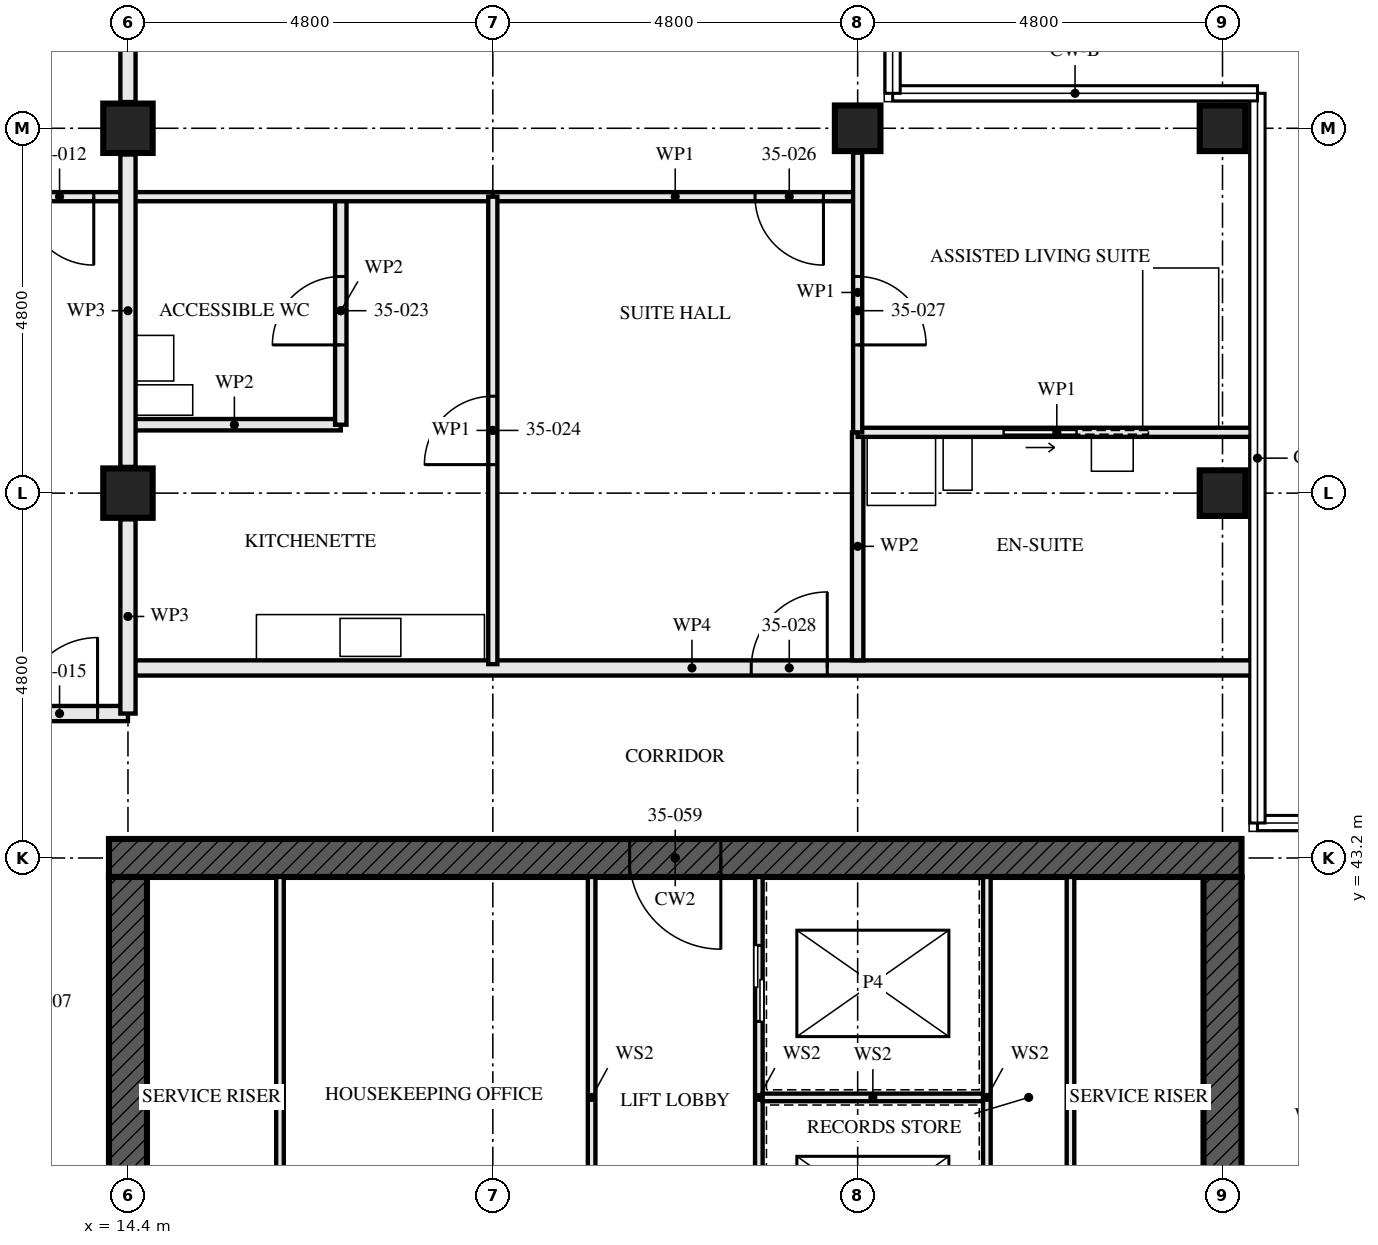
"""IFC4 building model, lengths in metres.
Left out: names, types, materials, properties, quantities, classifications, styles, units other than length and angle.
Written with IfcOpenShell. Run it as: python <this file> out.ifc"""

import sys

from ifc_helpers import new_model, si_unit, direction, frame, frame_2d, origin, origin_2d, place, context, subcontext, project, spatial, rectangle, hollow_rectangle, extrude, element, fill, save


model = new_model("IFC4")
c1 = context("Model", 3, precision=1e-05, world=origin(), true_north=direction((0.0, 1.0)))
c2 = subcontext(c1, "Body", "Model", "MODEL_VIEW")
j1 = project(units=[si_unit("LENGTHUNIT", "METRE"), si_unit("PLANEANGLEUNIT", "RADIAN")], contexts=[c1])
p1 = place(None, origin())
s1 = spatial("IfcSite", under=j1, at=p1, CompositionType="ELEMENT")
p2 = place(p1, origin())
s2 = spatial("IfcBuilding", under=s1, at=p2, CompositionType="ELEMENT")
p3 = place(p2, frame((0.0, 0.0, 129.5)))
s3 = spatial("IfcBuildingStorey", under=s2, at=p3, CompositionType="ELEMENT", Elevation=129.5)
for number, where, z_axis, x_axis in (
    (1, (14.4, 48.0, 0.0), (0.0, 0.0, 1.0), (1.0, 0.0, 0.0)),
    (2, (14.4, 52.8, 0.0), (0.0, 0.0, 1.0), (1.0, 0.0, 0.0)),
):
    element("IfcColumn", number, at=place(p3, frame(where, z_axis=z_axis, x_axis=x_axis)), inside=s3, PredefinedType="COLUMN", context=c2, shape_type="SweptSolid", body=[
        extrude(hollow_rectangle(XDim=0.65, YDim=0.65, WallThickness=0.05, at=origin_2d()), origin(), (0.0, 0.0, 1.0), 3.5),
    ])
for number, where, z_axis, x_axis in (
    (3, (24.0, 52.8, 0.0), (0.0, 0.0, 1.0), (0.0, 1.0, 0.0)),
    (4, (28.8, 48.0, 0.0), (0.0, 0.0, 1.0), (1.0, 0.0, 0.0)),
    (5, (28.8, 52.8, 0.0), (0.0, 0.0, 1.0), (0.0, 1.0, 0.0)),
):
    element("IfcColumn", number, at=place(p3, frame(where, z_axis=z_axis, x_axis=x_axis)), inside=s3, PredefinedType="COLUMN", context=c2, shape_type="SweptSolid", body=[
        extrude(hollow_rectangle(XDim=0.6, YDim=0.6, WallThickness=0.08, at=origin_2d()), origin(), (0.0, 0.0, 1.0), 3.5),
    ])
p4 = place(p3, frame((29.05, 43.2, -0.17), z_axis=(0.0, 0.0, 1.0), x_axis=(-1.0, 0.0, 0.0)))
e6 = element("IfcWall", 6, at=p4, inside=s3, PredefinedType="SHEAR", context=c2, shape_type="SweptSolid", body=[
    extrude(rectangle(XDim=14.9, YDim=0.5, at=frame_2d((7.45, 0.0))), origin(), (0.0, 0.0, 1.0), 3.5),
])
p5 = place(p4, frame((6.85, 0.0, 0.17)))
e7 = element("IfcOpeningElement", 7, at=p5, cuts=e6, PredefinedType="OPENING", context=c2, shape_type="SweptSolid", body=[
    extrude(rectangle(XDim=1.2, YDim=2.1, at=frame_2d((0.6, 1.05))), frame((0.0, 0.26, 0.0), z_axis=(0.0, -1.0, 0.0), x_axis=(1.0, 0.0, 0.0)), (0.0, 0.0, 1.0), 0.521),
])
p6 = place(p3, frame((14.4, 42.95, -0.17), z_axis=(0.0, 0.0, 1.0), x_axis=(0.0, -1.0, 0.0)))
e8 = element("IfcWall", 8, at=p6, inside=s3, PredefinedType="SHEAR", context=c2, shape_type="SweptSolid", body=[
    extrude(rectangle(XDim=13.9, YDim=0.5, at=frame_2d((6.95, 0.0))), origin(), (0.0, 0.0, 1.0), 3.5),
])
p7 = place(p6, frame((6.35, 0.0, 0.17)))
e9 = element("IfcOpeningElement", 9, at=p7, cuts=e8, PredefinedType="OPENING", context=c2, shape_type="SweptSolid", body=[
    extrude(rectangle(XDim=1.2, YDim=2.1, at=frame_2d((0.6, 1.05))), frame((0.0, 0.26, 0.0), z_axis=(0.0, -1.0, 0.0), x_axis=(1.0, 0.0, 0.0)), (0.0, 0.0, 1.0), 0.521),
])
p8 = place(p3, frame((28.8, 29.05, -0.17), z_axis=(0.0, 0.0, 1.0), x_axis=(0.0, 1.0, 0.0)))
e10 = element("IfcWall", 10, at=p8, inside=s3, PredefinedType="SHEAR", context=c2, shape_type="SweptSolid", body=[
    extrude(rectangle(XDim=13.9, YDim=0.5, at=frame_2d((6.95, 0.0))), origin(), (0.0, 0.0, 1.0), 3.5),
])
p9 = place(p8, frame((6.35, 0.0, 0.17)))
e11 = element("IfcOpeningElement", 11, at=p9, cuts=e10, PredefinedType="OPENING", context=c2, shape_type="SweptSolid", body=[
    extrude(rectangle(XDim=1.2, YDim=2.1, at=frame_2d((0.6, 1.05))), frame((0.0, 0.26, 0.0), z_axis=(0.0, -1.0, 0.0), x_axis=(1.0, 0.0, 0.0)), (0.0, 0.0, 1.0), 0.521),
])
p10 = place(p3, frame((14.4, 51.9, 0.0), z_axis=(0.0, 0.0, 1.0), x_axis=(-1.0, 0.0, 0.0)))
e12 = element("IfcWall", 12, at=p10, inside=s3, PredefinedType="PARTITIONING", context=c2, shape_type="SweptSolid", body=[
    extrude(rectangle(XDim=4.8, YDim=0.12, at=frame_2d((2.4, 0.0))), origin(), (0.0, 0.0, 1.0), 3.33),
])
p11 = place(p10, frame((0.45, 0.0, 0.0)))
e13 = element("IfcOpeningElement", 13, at=p11, cuts=e12, PredefinedType="OPENING", context=c2, shape_type="SweptSolid", body=[
    extrude(rectangle(XDim=0.9, YDim=2.1, at=frame_2d((0.45, 1.05))), frame((0.0, 0.071, 0.0), z_axis=(0.0, -1.0, 0.0), x_axis=(1.0, 0.0, 0.0)), (0.0, 0.0, 1.0), 0.141),
])
p12 = place(p10, frame((2.925, 0.0, 0.0)))
e14 = element("IfcOpeningElement", 14, at=p12, cuts=e12, PredefinedType="OPENING", context=c2, shape_type="SweptSolid", body=[
    extrude(rectangle(XDim=0.95, YDim=2.1, at=frame_2d((0.475, 1.05))), frame((0.0, 0.071, 0.0), z_axis=(0.0, -1.0, 0.0), x_axis=(1.0, 0.0, 0.0)), (0.0, 0.0, 1.0), 0.141),
])
p13 = place(p3, frame((14.4, 45.1, 0.0), z_axis=(0.0, 0.0, 1.0), x_axis=(-1.0, 0.0, 0.0)))
e15 = element("IfcWall", 15, at=p13, inside=s3, PredefinedType="PARTITIONING", context=c2, shape_type="SweptSolid", body=[
    extrude(rectangle(XDim=9.6, YDim=0.2, at=frame_2d((4.8, 0.0))), origin(), (0.0, 0.0, 1.0), 3.33),
])
p14 = place(p13, frame((0.4, 0.0, 0.0)))
e16 = element("IfcOpeningElement", 16, at=p14, cuts=e15, PredefinedType="OPENING", context=c2, shape_type="SweptSolid", body=[
    extrude(rectangle(XDim=1.0, YDim=2.1, at=frame_2d((0.5, 1.05))), frame((0.0, 0.111, 0.0), z_axis=(0.0, -1.0, 0.0), x_axis=(1.0, 0.0, 0.0)), (0.0, 0.0, 1.0), 0.221),
])
p15 = place(p3, frame((24.0, 48.8, 0.0), z_axis=(0.0, 0.0, 1.0), x_axis=(0.0, -1.0, 0.0)))
e17 = element("IfcWall", 17, at=p15, inside=s3, PredefinedType="PARTITIONING", context=c2, shape_type="SweptSolid", body=[
    extrude(rectangle(XDim=3.0, YDim=0.15, at=frame_2d((1.5, 0.0))), origin(), (0.0, 0.0, 1.0), 2.55),
])
p16 = place(p3, frame((17.2, 51.9, 0.0), z_axis=(0.0, 0.0, 1.0), x_axis=(0.0, -1.0, 0.0)))
e18 = element("IfcWall", 18, at=p16, inside=s3, PredefinedType="PARTITIONING", context=c2, shape_type="SweptSolid", body=[
    extrude(rectangle(XDim=3.0, YDim=0.15, at=frame_2d((1.5, 0.0))), origin(), (0.0, 0.0, 1.0), 3.33),
])
p17 = place(p16, frame((1.05, 0.0, 0.0)))
e19 = element("IfcOpeningElement", 19, at=p17, cuts=e18, PredefinedType="OPENING", context=c2, shape_type="SweptSolid", body=[
    extrude(rectangle(XDim=0.9, YDim=2.1, at=frame_2d((0.45, 1.05))), frame((0.0, 0.085, 0.0), z_axis=(0.0, -1.0, 0.0), x_axis=(1.0, 0.0, 0.0)), (0.0, 0.0, 1.0), 0.171),
])
p18 = place(p3, frame((17.2, 48.9, 0.0), z_axis=(0.0, 0.0, 1.0), x_axis=(-1.0, 0.0, 0.0)))
e20 = element("IfcWall", 20, at=p18, inside=s3, PredefinedType="PARTITIONING", context=c2, shape_type="SweptSolid", body=[
    extrude(rectangle(XDim=2.8, YDim=0.15, at=frame_2d((1.4, 0.0))), origin(), (0.0, 0.0, 1.0), 3.33),
])
p19 = place(p3, frame((19.2, 51.9, 0.0), z_axis=(0.0, 0.0, 1.0), x_axis=(0.0, -1.0, 0.0)))
e21 = element("IfcWall", 21, at=p19, inside=s3, PredefinedType="PARTITIONING", context=c2, shape_type="SweptSolid", body=[
    extrude(rectangle(XDim=6.15, YDim=0.12, at=frame_2d((3.075, 0.0))), origin(), (0.0, 0.0, 1.0), 2.55),
])
p20 = place(p19, frame((2.625, 0.0, 0.0)))
e22 = element("IfcOpeningElement", 22, at=p20, cuts=e21, PredefinedType="OPENING", context=c2, shape_type="SweptSolid", body=[
    extrude(rectangle(XDim=0.9, YDim=2.1, at=frame_2d((0.45, 1.05))), frame((0.0, 0.071, 0.0), z_axis=(0.0, -1.0, 0.0), x_axis=(1.0, 0.0, 0.0)), (0.0, 0.0, 1.0), 0.141),
])
p21 = place(p3, frame((29.24, 48.8, 0.0), z_axis=(0.0, 0.0, 1.0), x_axis=(-1.0, 0.0, 0.0)))
e23 = element("IfcWall", 23, at=p21, inside=s3, PredefinedType="PARTITIONING", context=c2, shape_type="SweptSolid", body=[
    extrude(rectangle(XDim=5.24, YDim=0.12, at=frame_2d((2.62, 0.0))), origin(), (0.0, 0.0, 1.0), 2.32),
])
p22 = place(p21, frame((2.365, 0.0, 0.0)))
e24 = element("IfcOpeningElement", 24, at=p22, cuts=e23, PredefinedType="OPENING", context=c2, shape_type="SweptSolid", body=[
    extrude(rectangle(XDim=0.95, YDim=2.1, at=frame_2d((0.475, 1.05))), frame((0.0, 0.071, 0.0), z_axis=(0.0, -1.0, 0.0), x_axis=(1.0, 0.0, 0.0)), (0.0, 0.0, 1.0), 0.141),
])
p23 = place(p3, frame((24.0, 51.9, 0.0), z_axis=(0.0, 0.0, 1.0), x_axis=(-1.0, 0.0, 0.0)))
e25 = element("IfcWall", 25, at=p23, inside=s3, PredefinedType="PARTITIONING", context=c2, shape_type="SweptSolid", body=[
    extrude(rectangle(XDim=4.8, YDim=0.12, at=frame_2d((2.4, 0.0))), origin(), (0.0, 0.0, 1.0), 3.33),
])
p24 = place(p23, frame((0.45, 0.0, 0.0)))
e26 = element("IfcOpeningElement", 26, at=p24, cuts=e25, PredefinedType="OPENING", context=c2, shape_type="SweptSolid", body=[
    extrude(rectangle(XDim=0.9, YDim=2.1, at=frame_2d((0.45, 1.05))), frame((0.0, 0.071, 0.0), z_axis=(0.0, -1.0, 0.0), x_axis=(1.0, 0.0, 0.0)), (0.0, 0.0, 1.0), 0.141),
])
p25 = place(p3, frame((19.2, 51.9, 0.0), z_axis=(0.0, 0.0, 1.0), x_axis=(-1.0, 0.0, 0.0)))
e27 = element("IfcWall", 27, at=p25, inside=s3, PredefinedType="PARTITIONING", context=c2, shape_type="SweptSolid", body=[
    extrude(rectangle(XDim=4.8, YDim=0.12, at=frame_2d((2.4, 0.0))), origin(), (0.0, 0.0, 1.0), 3.33),
])
p26 = place(p3, frame((24.0, 52.48, 0.0), z_axis=(0.0, 0.0, 1.0), x_axis=(0.0, -1.0, 0.0)))
e28 = element("IfcWall", 28, at=p26, inside=s3, PredefinedType="PARTITIONING", context=c2, shape_type="SweptSolid", body=[
    extrude(rectangle(XDim=3.68, YDim=0.12, at=frame_2d((1.84, 0.0))), origin(), (0.0, 0.0, 1.0), 3.33),
])
p27 = place(p26, frame((1.63, 0.0, 0.0)))
e29 = element("IfcOpeningElement", 29, at=p27, cuts=e28, PredefinedType="OPENING", context=c2, shape_type="SweptSolid", body=[
    extrude(rectangle(XDim=0.9, YDim=2.1, at=frame_2d((0.45, 1.05))), frame((0.0, 0.071, 0.0), z_axis=(0.0, -1.0, 0.0), x_axis=(1.0, 0.0, 0.0)), (0.0, 0.0, 1.0), 0.141),
])
p28 = place(p3, frame((29.24, 45.7, 0.0), z_axis=(0.0, 0.0, 1.0), x_axis=(-1.0, 0.0, 0.0)))
e30 = element("IfcWall", 30, at=p28, inside=s3, PredefinedType="PARTITIONING", context=c2, shape_type="SweptSolid", body=[
    extrude(rectangle(XDim=14.84, YDim=0.2, at=frame_2d((7.42, 0.0))), origin(), (0.0, 0.0, 1.0), 2.32),
])
p29 = place(p28, frame((5.64, 0.0, 0.0)))
e31 = element("IfcOpeningElement", 31, at=p29, cuts=e30, PredefinedType="OPENING", context=c2, shape_type="SweptSolid", body=[
    extrude(rectangle(XDim=1.0, YDim=2.1, at=frame_2d((0.5, 1.05))), frame((0.0, 0.111, 0.0), z_axis=(0.0, -1.0, 0.0), x_axis=(1.0, 0.0, 0.0)), (0.0, 0.0, 1.0), 0.221),
])
for number, where, z_axis, x_axis in (
    (32, (16.4, 37.15, 0.0), (0.0, 0.0, 1.0), (0.0, 1.0, 0.0)),
    (33, (26.8, 37.15, 0.0), (0.0, 0.0, 1.0), (0.0, 1.0, 0.0)),
):
    element("IfcWall", number, at=place(p3, frame(where, z_axis=z_axis, x_axis=x_axis)), inside=s3, PredefinedType="SOLIDWALL", context=c2, shape_type="SweptSolid", body=[
        extrude(rectangle(XDim=5.8, YDim=0.1, at=frame_2d((2.9, 0.0))), origin(), (0.0, 0.0, 1.0), 3.33),
    ])
p30 = place(p3, frame((20.5, 37.15, 0.0), z_axis=(0.0, 0.0, 1.0), x_axis=(0.0, 1.0, 0.0)))
e34 = element("IfcWall", 34, at=p30, inside=s3, PredefinedType="SOLIDWALL", context=c2, shape_type="SweptSolid", body=[
    extrude(rectangle(XDim=5.8, YDim=0.1, at=frame_2d((2.9, 0.0))), origin(), (0.0, 0.0, 1.0), 3.33),
])
p31 = place(p30, frame((0.975, 0.0, 0.0)))
e35 = element("IfcOpeningElement", 35, at=p31, cuts=e34, PredefinedType="OPENING", context=c2, shape_type="SweptSolid", body=[
    extrude(rectangle(XDim=0.9, YDim=2.1, at=frame_2d((0.45, 1.05))), frame((0.0, 0.061, 0.0), z_axis=(0.0, -1.0, 0.0), x_axis=(1.0, 0.0, 0.0)), (0.0, 0.0, 1.0), 0.121),
])
p32 = place(p3, frame((22.7, 37.15, 0.0), z_axis=(0.0, 0.0, 1.0), x_axis=(0.0, 1.0, 0.0)))
e36 = element("IfcWall", 36, at=p32, inside=s3, PredefinedType="SOLIDWALL", context=c2, shape_type="SweptSolid", body=[
    extrude(rectangle(XDim=5.8, YDim=0.1, at=frame_2d((2.9, 0.0))), origin(), (0.0, 0.0, 1.0), 3.33),
])
p33 = place(p32, frame((0.925, 0.0, 0.0)))
e37 = element("IfcOpeningElement", 37, at=p33, cuts=e36, PredefinedType="OPENING", context=c2, shape_type="SweptSolid", body=[
    extrude(rectangle(XDim=1.0, YDim=2.1, at=frame_2d((0.5, 1.05))), frame((0.0, 0.061, 0.0), z_axis=(0.0, -1.0, 0.0), x_axis=(1.0, 0.0, 0.0)), (0.0, 0.0, 1.0), 0.121),
])
p34 = place(p32, frame((3.9, 0.0, 0.0)))
e38 = element("IfcOpeningElement", 38, at=p34, cuts=e36, PredefinedType="OPENING", context=c2, shape_type="SweptSolid", body=[
    extrude(rectangle(XDim=1.0, YDim=2.1, at=frame_2d((0.5, 1.05))), frame((0.0, 0.061, 0.0), z_axis=(0.0, -1.0, 0.0), x_axis=(1.0, 0.0, 0.0)), (0.0, 0.0, 1.0), 0.121),
])
p35 = place(p3, frame((22.75, 40.05, 0.0), z_axis=(0.0, 0.0, 1.0), x_axis=(1.0, 0.0, 0.0)))
e39 = element("IfcWall", 39, at=p35, inside=s3, PredefinedType="SOLIDWALL", context=c2, shape_type="SweptSolid", body=[
    extrude(rectangle(XDim=2.9, YDim=0.1, at=frame_2d((1.45, 0.0))), origin(), (0.0, 0.0, 1.0), 3.33),
])
p36 = place(p3, frame((25.7, 37.15, 0.0), z_axis=(0.0, 0.0, 1.0), x_axis=(0.0, 1.0, 0.0)))
e40 = element("IfcWall", 40, at=p36, inside=s3, PredefinedType="SOLIDWALL", context=c2, shape_type="SweptSolid", body=[
    extrude(rectangle(XDim=5.8, YDim=0.1, at=frame_2d((2.9, 0.0))), origin(), (0.0, 0.0, 1.0), 3.33),
])
p37 = place(p3, frame((14.4, 45.1, 0.0), z_axis=(0.0, 0.0, 1.0), x_axis=(0.0, 1.0, 0.0)))
e41 = element("IfcWall", 41, at=p37, inside=s3, PredefinedType="PARTITIONING", context=c2, shape_type="SweptSolid", body=[
    extrude(rectangle(XDim=2.555, YDim=0.2, at=frame_2d((1.277, 0.0))), origin(), (0.0, 0.0, 1.0), 2.32),
])
p38 = place(p3, frame((14.4, 48.345, 0.0), z_axis=(0.0, 0.0, 1.0), x_axis=(0.0, 1.0, 0.0)))
e42 = element("IfcWall", 42, at=p38, inside=s3, PredefinedType="PARTITIONING", context=c2, shape_type="SweptSolid", body=[
    extrude(rectangle(XDim=4.11, YDim=0.2, at=frame_2d((2.055, 0.0))), origin(), (0.0, 0.0, 1.0), 2.32),
])
p39 = place(p3, frame((14.4, 53.145, 0.0), z_axis=(0.0, 0.0, 1.0), x_axis=(0.0, 1.0, 0.0)))
e43 = element("IfcWall", 43, at=p39, inside=s3, PredefinedType="PARTITIONING", context=c2, shape_type="SweptSolid", body=[
    extrude(rectangle(XDim=4.135, YDim=0.2, at=frame_2d((2.067, 0.0))), origin(), (0.0, 0.0, 1.0), 2.32),
])
p40 = place(p11, origin())
e44 = element("IfcDoor", 44, at=p40, inside=s3, OperationType="SINGLE_SWING_RIGHT", PredefinedType="DOOR", context=c2, shape_type="SweptSolid", body=[
    extrude(rectangle(XDim=0.9, YDim=2.1, at=frame_2d((0.45, 1.05))), frame((0.0, 0.022, 0.0), z_axis=(0.0, -1.0, 0.0), x_axis=(1.0, 0.0, 0.0)), (0.0, 0.0, 1.0), 0.044),
])
fill(e13, e44)
p41 = place(p14, frame((1.0, 0.0, 0.0), z_axis=(0.0, 0.0, 1.0), x_axis=(-1.0, 0.0, 0.0)))
e45 = element("IfcDoor", 45, at=p41, inside=s3, OperationType="SINGLE_SWING_LEFT", PredefinedType="DOOR", context=c2, shape_type="SweptSolid", body=[
    extrude(rectangle(XDim=1.0, YDim=2.1, at=frame_2d((0.5, 1.05))), frame((0.0, 0.027, 0.0), z_axis=(0.0, -1.0, 0.0), x_axis=(1.0, 0.0, 0.0)), (0.0, 0.0, 1.0), 0.054),
])
fill(e16, e45)
p42 = place(p17, frame((0.9, 0.0, 0.0), z_axis=(0.0, 0.0, 1.0), x_axis=(-1.0, 0.0, 0.0)))
e46 = element("IfcDoor", 46, at=p42, inside=s3, OperationType="SINGLE_SWING_RIGHT", PredefinedType="DOOR", context=c2, shape_type="SweptSolid", body=[
    extrude(rectangle(XDim=0.9, YDim=2.1, at=frame_2d((0.45, 1.05))), frame((0.0, 0.022, 0.0), z_axis=(0.0, -1.0, 0.0), x_axis=(1.0, 0.0, 0.0)), (0.0, 0.0, 1.0), 0.044),
])
fill(e19, e46)
p43 = place(p20, frame((0.9, 0.0, 0.0), z_axis=(0.0, 0.0, 1.0), x_axis=(-1.0, 0.0, 0.0)))
e47 = element("IfcDoor", 47, at=p43, inside=s3, OperationType="SINGLE_SWING_RIGHT", PredefinedType="DOOR", context=c2, shape_type="SweptSolid", body=[
    extrude(rectangle(XDim=0.9, YDim=2.1, at=frame_2d((0.45, 1.05))), frame((0.0, 0.022, 0.0), z_axis=(0.0, -1.0, 0.0), x_axis=(1.0, 0.0, 0.0)), (0.0, 0.0, 1.0), 0.044),
])
fill(e22, e47)
p44 = place(p22, origin())
e48 = element("IfcDoor", 48, at=p44, inside=s3, OperationType="SLIDING_TO_RIGHT", PredefinedType="DOOR", context=c2, shape_type="SweptSolid", body=[
    extrude(rectangle(XDim=0.95, YDim=2.1, at=frame_2d((0.475, 1.05))), frame((0.0, 0.022, 0.0), z_axis=(0.0, -1.0, 0.0), x_axis=(1.0, 0.0, 0.0)), (0.0, 0.0, 1.0), 0.044),
])
fill(e24, e48)
p45 = place(p24, origin())
e49 = element("IfcDoor", 49, at=p45, inside=s3, OperationType="SINGLE_SWING_RIGHT", PredefinedType="DOOR", context=c2, shape_type="SweptSolid", body=[
    extrude(rectangle(XDim=0.9, YDim=2.1, at=frame_2d((0.45, 1.05))), frame((0.0, 0.022, 0.0), z_axis=(0.0, -1.0, 0.0), x_axis=(1.0, 0.0, 0.0)), (0.0, 0.0, 1.0), 0.044),
])
fill(e26, e49)
p46 = place(p27, origin())
e50 = element("IfcDoor", 50, at=p46, inside=s3, OperationType="SINGLE_SWING_LEFT", PredefinedType="DOOR", context=c2, shape_type="SweptSolid", body=[
    extrude(rectangle(XDim=0.9, YDim=2.1, at=frame_2d((0.45, 1.05))), frame((0.0, 0.022, 0.0), z_axis=(0.0, -1.0, 0.0), x_axis=(1.0, 0.0, 0.0)), (0.0, 0.0, 1.0), 0.044),
])
fill(e29, e50)
p47 = place(p29, frame((1.0, 0.0, 0.0), z_axis=(0.0, 0.0, 1.0), x_axis=(-1.0, 0.0, 0.0)))
e51 = element("IfcDoor", 51, at=p47, inside=s3, OperationType="SINGLE_SWING_LEFT", PredefinedType="DOOR", context=c2, shape_type="SweptSolid", body=[
    extrude(rectangle(XDim=1.0, YDim=2.1, at=frame_2d((0.5, 1.05))), frame((0.0, 0.027, 0.0), z_axis=(0.0, -1.0, 0.0), x_axis=(1.0, 0.0, 0.0)), (0.0, 0.0, 1.0), 0.054),
])
fill(e31, e51)
p48 = place(p34, origin())
e52 = element("IfcDoor", 52, at=p48, inside=s3, OperationType="SLIDING_TO_LEFT", PredefinedType="DOOR", context=c2, shape_type="SweptSolid", body=[
    extrude(rectangle(XDim=1.0, YDim=2.1, at=frame_2d((0.5, 1.05))), frame((0.0, 0.05, 0.0), z_axis=(0.0, -1.0, 0.0), x_axis=(1.0, 0.0, 0.0)), (0.0, 0.0, 1.0), 0.1),
])
fill(e38, e52)
p49 = place(p5, origin())
e53 = element("IfcDoor", 53, at=p49, inside=s3, OperationType="SINGLE_SWING_LEFT", PredefinedType="DOOR", context=c2, shape_type="SweptSolid", body=[
    extrude(rectangle(XDim=1.2, YDim=2.1, at=frame_2d((0.6, 1.05))), frame((0.0, 0.027, 0.0), z_axis=(0.0, -1.0, 0.0), x_axis=(1.0, 0.0, 0.0)), (0.0, 0.0, 1.0), 0.054),
])
fill(e7, e53)
save(model, sys.argv[1])
